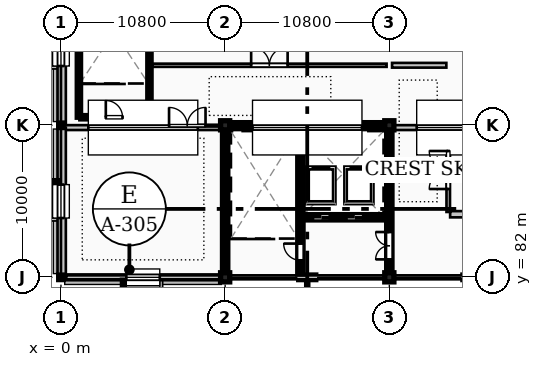
"""IFC4 building model, lengths in metres.
Left out: names, types, materials, properties, quantities, classifications, styles, units other than length and angle.
Written with IfcOpenShell. Run it as: python <this file> out.ifc"""

import sys

from ifc_helpers import new_model, si_unit, direction, frame, frame_2d, origin, origin_2d, place, context, subcontext, project, spatial, polyline, rectangle, i_section, outline, extrude, element, fill, save


model = new_model("IFC4")
c1 = context("Model", 3, precision=1e-05, world=origin(), true_north=direction((0.0, 1.0)))
c2 = subcontext(c1, "Body", "Model", "MODEL_VIEW")
j1 = project(units=[si_unit("LENGTHUNIT", "METRE"), si_unit("PLANEANGLEUNIT", "RADIAN")], contexts=[c1])
p1 = place(None, origin())
s1 = spatial("IfcSite", under=j1, at=p1, CompositionType="ELEMENT")
p2 = place(p1, origin())
s2 = spatial("IfcBuilding", under=s1, at=p2, CompositionType="ELEMENT")
p3 = place(p2, frame((0.0, 0.0, 28.8)))
s3 = spatial("IfcBuildingStorey", under=s2, at=p3, CompositionType="ELEMENT", Elevation=28.8)
for number, where, z_axis, x_axis in (
    (1, (0.0, 82.0, 0.0), (0.0, 0.0, 1.0), (1.0, 0.0, 0.0)),
    (2, (0.0, 92.0, 0.0), (0.0, 0.0, 1.0), (1.0, 0.0, 0.0)),
):
    element("IfcColumn", number, at=place(p3, frame(where, z_axis=z_axis, x_axis=x_axis)), inside=s3, PredefinedType="COLUMN", context=c2, shape_type="SweptSolid", body=[
        extrude(i_section(OverallWidth=0.3, OverallDepth=0.3, WebThickness=0.011, FlangeThickness=0.019, FilletRadius=0.027, at=origin_2d()), origin(), (0.0, 0.0, 1.0), 5.4),
    ])
for number, where, z_axis, x_axis in (
    (3, (10.8, 82.0, 0.0), (0.0, 0.0, 1.0), (1.0, 0.0, 0.0)),
    (4, (10.8, 92.0, 0.0), (0.0, 0.0, 1.0), (1.0, 0.0, 0.0)),
    (5, (21.6, 82.0, 0.0), (0.0, 0.0, 1.0), (1.0, 0.0, 0.0)),
    (6, (21.6, 92.0, 0.0), (0.0, 0.0, 1.0), (1.0, 0.0, 0.0)),
):
    element("IfcColumn", number, at=place(p3, frame(where, z_axis=z_axis, x_axis=x_axis)), inside=s3, PredefinedType="COLUMN", context=c2, shape_type="SweptSolid", body=[
        extrude(rectangle(XDim=0.6, YDim=0.6, at=origin_2d()), origin(), (0.0, 0.0, 1.0), 5.4),
    ])
p4 = place(p3, frame((0.0, 101.855, 0.0), z_axis=(0.0, 0.0, 1.0), x_axis=(0.0, -1.0, 0.0)))
e7 = element("IfcWall", 7, at=p4, inside=s3, PredefinedType="STANDARD", context=c2, shape_type="SweptSolid", body=[
    extrude(rectangle(XDim=9.71, YDim=0.45, at=frame_2d((4.855, 0.0))), origin(), (0.0, 0.0, 1.0), 5.16),
])
p5 = place(p4, frame((3.755, 0.0, 1.0)))
e8 = element("IfcOpeningElement", 8, at=p5, cuts=e7, PredefinedType="OPENING", context=c2, shape_type="SweptSolid", body=[
    extrude(rectangle(XDim=2.2, YDim=3.0, at=frame_2d((1.1, 1.5))), frame((0.0, 0.235, 0.0), z_axis=(0.0, -1.0, 0.0), x_axis=(1.0, 0.0, 0.0)), (0.0, 0.0, 1.0), 0.47),
])
p6 = place(p3, frame((0.0, 91.855, 0.0), z_axis=(0.0, 0.0, 1.0), x_axis=(0.0, -1.0, 0.0)))
e9 = element("IfcWall", 9, at=p6, inside=s3, PredefinedType="STANDARD", context=c2, shape_type="SweptSolid", body=[
    extrude(rectangle(XDim=9.71, YDim=0.45, at=frame_2d((4.855, 0.0))), origin(), (0.0, 0.0, 1.0), 5.16),
])
p7 = place(p6, frame((3.755, 0.0, 1.0)))
e10 = element("IfcOpeningElement", 10, at=p7, cuts=e9, PredefinedType="OPENING", context=c2, shape_type="SweptSolid", body=[
    extrude(rectangle(XDim=2.2, YDim=3.0, at=frame_2d((1.1, 1.5))), frame((0.0, 0.235, 0.0), z_axis=(0.0, -1.0, 0.0), x_axis=(1.0, 0.0, 0.0)), (0.0, 0.0, 1.0), 0.47),
])
p8 = place(p3, frame((0.145, 82.0, 0.0), z_axis=(0.0, 0.0, 1.0), x_axis=(1.0, 0.0, 0.0)))
e11 = element("IfcWall", 11, at=p8, inside=s3, PredefinedType="STANDARD", context=c2, shape_type="SweptSolid", body=[
    extrude(rectangle(XDim=10.51, YDim=0.38, at=frame_2d((5.255, 0.0))), origin(), (0.0, 0.0, 1.0), 5.044),
])
p9 = place(p8, frame((4.155, 0.0, 1.0)))
e12 = element("IfcOpeningElement", 12, at=p9, cuts=e11, PredefinedType="OPENING", context=c2, shape_type="SweptSolid", body=[
    extrude(rectangle(XDim=2.2, YDim=3.0, at=frame_2d((1.1, 1.5))), frame((0.0, 0.2, 0.0), z_axis=(0.0, -1.0, 0.0), x_axis=(1.0, 0.0, 0.0)), (0.0, 0.0, 1.0), 0.4),
])
p10 = place(p3, frame((15.55, 82.0, 0.0), z_axis=(0.0, 0.0, 1.0), x_axis=(1.0, 0.0, 0.0)))
e13 = element("IfcWall", 13, at=p10, inside=s3, PredefinedType="STANDARD", context=c2, shape_type="SweptSolid", body=[
    extrude(rectangle(XDim=1.3, YDim=0.48, at=frame_2d((0.65, 0.0))), origin(), (0.0, 0.0, 1.0), 5.044),
])
p11 = place(p3, frame((10.945, 82.0, 0.0), z_axis=(0.0, 0.0, 1.0), x_axis=(1.0, 0.0, 0.0)))
e14 = element("IfcWall", 14, at=p11, inside=s3, PredefinedType="STANDARD", context=c2, shape_type="SweptSolid", body=[
    extrude(rectangle(XDim=0.225, YDim=0.3, at=frame_2d((0.112, 0.0))), origin(), (0.0, 0.0, 1.0), 5.16),
])
p12 = place(p3, frame((21.23, 82.0, 0.0), z_axis=(0.0, 0.0, 1.0), x_axis=(1.0, 0.0, 0.0)))
e15 = element("IfcWall", 15, at=p12, inside=s3, PredefinedType="STANDARD", context=c2, shape_type="SweptSolid", body=[
    extrude(rectangle(XDim=0.225, YDim=0.3, at=frame_2d((0.113, 0.0))), origin(), (0.0, 0.0, 1.0), 5.16),
])
p13 = place(p3, frame((21.745, 82.0, 0.0), z_axis=(0.0, 0.0, 1.0), x_axis=(1.0, 0.0, 0.0)))
e16 = element("IfcWall", 16, at=p13, inside=s3, PredefinedType="STANDARD", context=c2, shape_type="SweptSolid", body=[
    extrude(rectangle(XDim=0.225, YDim=0.3, at=frame_2d((0.112, 0.0))), origin(), (0.0, 0.0, 1.0), 5.16),
])
p14 = place(p3, frame((0.16, 91.85, 5.4), z_axis=(0.0, 0.0, 1.0), x_axis=(1.0, 0.0, 0.0)))
e17 = element("IfcWall", 17, at=p14, inside=s3, PredefinedType="STANDARD", context=c2, shape_type="SweptSolid", body=[
    extrude(rectangle(XDim=10.48, YDim=0.32, at=frame_2d((5.24, 0.0))), origin(), (0.0, 0.0, 1.0), 2.45),
])
p15 = place(p14, frame((1.64, 0.0, 0.45)))
e18 = element("IfcOpeningElement", 18, at=p15, cuts=e17, PredefinedType="OPENING", context=c2, shape_type="SweptSolid", body=[
    extrude(rectangle(XDim=7.2, YDim=1.5, at=frame_2d((3.6, 0.75))), frame((0.0, 0.17, 0.0), z_axis=(0.0, -1.0, 0.0), x_axis=(1.0, 0.0, 0.0)), (0.0, 0.0, 1.0), 0.34),
])
p16 = place(p3, frame((10.96, 91.85, 5.4), z_axis=(0.0, 0.0, 1.0), x_axis=(1.0, 0.0, 0.0)))
e19 = element("IfcWall", 19, at=p16, inside=s3, PredefinedType="STANDARD", context=c2, shape_type="SweptSolid", body=[
    extrude(rectangle(XDim=10.48, YDim=0.32, at=frame_2d((5.24, 0.0))), origin(), (0.0, 0.0, 1.0), 2.45),
])
p17 = place(p16, frame((1.64, 0.0, 0.45)))
e20 = element("IfcOpeningElement", 20, at=p17, cuts=e19, PredefinedType="OPENING", context=c2, shape_type="SweptSolid", body=[
    extrude(rectangle(XDim=7.2, YDim=1.5, at=frame_2d((3.6, 0.75))), frame((0.0, 0.17, 0.0), z_axis=(0.0, -1.0, 0.0), x_axis=(1.0, 0.0, 0.0)), (0.0, 0.0, 1.0), 0.34),
])
p18 = place(p3, frame((21.76, 91.85, 5.4), z_axis=(0.0, 0.0, 1.0), x_axis=(1.0, 0.0, 0.0)))
e21 = element("IfcWall", 21, at=p18, inside=s3, PredefinedType="STANDARD", context=c2, shape_type="SweptSolid", body=[
    extrude(rectangle(XDim=10.48, YDim=0.32, at=frame_2d((5.24, 0.0))), origin(), (0.0, 0.0, 1.0), 2.45),
])
p19 = place(p18, frame((1.64, 0.0, 0.45)))
e22 = element("IfcOpeningElement", 22, at=p19, cuts=e21, PredefinedType="OPENING", context=c2, shape_type="SweptSolid", body=[
    extrude(rectangle(XDim=7.2, YDim=1.5, at=frame_2d((3.6, 0.75))), frame((0.0, 0.17, 0.0), z_axis=(0.0, -1.0, 0.0), x_axis=(1.0, 0.0, 0.0)), (0.0, 0.0, 1.0), 0.34),
])
for number, where, z_axis, x_axis in (
    (23, (0.16, 82.05, 5.4), (0.0, 0.0, 1.0), (0.0, 1.0, 0.0)),
    (24, (0.16, 92.05, 5.4), (0.0, 0.0, 1.0), (0.0, 1.0, 0.0)),
):
    element("IfcWall", number, at=place(p3, frame(where, z_axis=z_axis, x_axis=x_axis)), inside=s3, PredefinedType="STANDARD", context=c2, shape_type="SweptSolid", body=[
        extrude(outline(polyline([(0.0, 0.0), (9.8, 0.0), (9.8, 2.55), (0.0, 0.15), (0.0, 0.0)])), frame((0.0, 0.16, 0.0), z_axis=(0.0, -1.0, 0.0), x_axis=(1.0, 0.0, 0.0)), (0.0, 0.0, 1.0), 0.32),
    ])
p20 = place(p3, frame((0.35, 82.0, 5.22), z_axis=(0.0, 0.0, 1.0), x_axis=(1.0, 0.0, 0.0)))
e25 = element("IfcWall", 25, at=p20, inside=s3, PredefinedType="PARAPET", context=c2, shape_type="SweptSolid", body=[
    extrude(rectangle(XDim=74.9, YDim=0.26, at=frame_2d((37.45, 0.0))), origin(), (0.0, 0.0, 1.0), 0.55),
])
p21 = place(p3, frame((11.1, 92.0, 0.0), z_axis=(0.0, 0.0, 1.0), x_axis=(1.0, 0.0, 0.0)))
e26 = element("IfcWall", 26, at=p21, inside=s3, PredefinedType="SHEAR", context=c2, shape_type="SweptSolid", body=[
    extrude(rectangle(XDim=10.2, YDim=0.35, at=frame_2d((5.1, 0.0))), origin(), (0.0, 0.0, 1.0), 5.16),
])
p22 = place(p3, frame((10.8, 82.3, 0.0), z_axis=(0.0, 0.0, 1.0), x_axis=(0.0, 1.0, 0.0)))
e27 = element("IfcWall", 27, at=p22, inside=s3, PredefinedType="SHEAR", context=c2, shape_type="SweptSolid", body=[
    extrude(rectangle(XDim=9.4, YDim=0.35, at=frame_2d((4.7, 0.0))), origin(), (0.0, 0.0, 1.0), 5.16),
])
p23 = place(p3, frame((21.6, 82.3, 0.0), z_axis=(0.0, 0.0, 1.0), x_axis=(0.0, 1.0, 0.0)))
e28 = element("IfcWall", 28, at=p23, inside=s3, PredefinedType="SHEAR", context=c2, shape_type="SweptSolid", body=[
    extrude(rectangle(XDim=9.4, YDim=0.35, at=frame_2d((4.7, 0.0))), origin(), (0.0, 0.0, 1.0), 5.16),
])
p24 = place(p23, frame((0.88, 0.0, 0.0)))
e29 = element("IfcOpeningElement", 29, at=p24, cuts=e28, PredefinedType="OPENING", context=c2, shape_type="SweptSolid", body=[
    extrude(rectangle(XDim=1.8, YDim=2.25, at=frame_2d((0.9, 1.125))), frame((0.0, 0.185, 0.0), z_axis=(0.0, -1.0, 0.0), x_axis=(1.0, 0.0, 0.0)), (0.0, 0.0, 1.0), 0.37),
])
p25 = place(p3, frame((15.75, 82.22, 0.0), z_axis=(0.0, 0.0, 1.0), x_axis=(0.0, 1.0, 0.0)))
e30 = element("IfcWall", 30, at=p25, inside=s3, PredefinedType="SHEAR", context=c2, shape_type="SweptSolid", body=[
    extrude(rectangle(XDim=9.605, YDim=0.35, at=frame_2d((4.802, 0.0))), origin(), (0.0, 0.0, 1.0), 5.16),
])
p26 = place(p25, frame((0.9, 0.0, 0.0)))
e31 = element("IfcOpeningElement", 31, at=p26, cuts=e30, PredefinedType="OPENING", context=c2, shape_type="SweptSolid", body=[
    extrude(rectangle(XDim=1.1, YDim=2.2, at=frame_2d((0.55, 1.1))), frame((0.0, 0.185, 0.0), z_axis=(0.0, -1.0, 0.0), x_axis=(1.0, 0.0, 0.0)), (0.0, 0.0, 1.0), 0.37),
])
p27 = place(p3, frame((15.93, 85.95, 0.0), z_axis=(0.0, 0.0, 1.0), x_axis=(1.0, 0.0, 0.0)))
e32 = element("IfcWall", 32, at=p27, inside=s3, PredefinedType="SHEAR", context=c2, shape_type="SweptSolid", body=[
    extrude(rectangle(XDim=5.49, YDim=0.35, at=frame_2d((2.745, 0.0))), origin(), (0.0, 0.0, 1.0), 5.16),
])
p28 = place(p27, frame((0.65, 0.0, 0.0)))
e33 = element("IfcOpeningElement", 33, at=p28, cuts=e32, PredefinedType="OPENING", context=c2, shape_type="SweptSolid", body=[
    extrude(rectangle(XDim=1.1, YDim=2.2, at=frame_2d((0.55, 1.1))), frame((0.0, 0.185, 0.0), z_axis=(0.0, -1.0, 0.0), x_axis=(1.0, 0.0, 0.0)), (0.0, 0.0, 1.0), 0.37),
])
p29 = place(p27, frame((2.85, 0.0, 0.0)))
e34 = element("IfcOpeningElement", 34, at=p29, cuts=e32, PredefinedType="OPENING", context=c2, shape_type="SweptSolid", body=[
    extrude(rectangle(XDim=1.1, YDim=2.2, at=frame_2d((0.55, 1.1))), frame((0.0, 0.185, 0.0), z_axis=(0.0, -1.0, 0.0), x_axis=(1.0, 0.0, 0.0)), (0.0, 0.0, 1.0), 0.37),
])
for number, where, z_axis, x_axis in (
    (35, (1.18, 92.53, 0.0), (0.0, 0.0, 1.0), (0.0, 1.0, 0.0)),
    (36, (5.82, 92.53, 0.0), (0.0, 0.0, 1.0), (0.0, 1.0, 0.0)),
):
    element("IfcWall", number, at=place(p3, frame(where, z_axis=z_axis, x_axis=x_axis)), inside=s3, PredefinedType="SHEAR", context=c2, shape_type="SweptSolid", body=[
        extrude(rectangle(XDim=9.14, YDim=0.22, at=frame_2d((4.57, 0.0))), origin(), (0.0, 0.0, 1.0), 5.16),
    ])
p30 = place(p3, frame((1.3, 92.53, 0.0), z_axis=(0.0, 0.0, 1.0), x_axis=(1.0, 0.0, 0.0)))
e37 = element("IfcWall", 37, at=p30, inside=s3, PredefinedType="SHEAR", context=c2, shape_type="SweptSolid", body=[
    extrude(rectangle(XDim=4.4, YDim=0.22, at=frame_2d((2.2, 0.0))), origin(), (0.0, 0.0, 1.0), 5.16),
])
p31 = place(p30, frame((1.65, 0.0, 0.0)))
e38 = element("IfcOpeningElement", 38, at=p31, cuts=e37, PredefinedType="OPENING", context=c2, shape_type="SweptSolid", body=[
    extrude(rectangle(XDim=1.1, YDim=2.2, at=frame_2d((0.55, 1.1))), frame((0.0, 0.12, 0.0), z_axis=(0.0, -1.0, 0.0), x_axis=(1.0, 0.0, 0.0)), (0.0, 0.0, 1.0), 0.24),
])
p32 = place(p3, frame((25.6, 86.15, 0.0), z_axis=(0.0, 0.0, 1.0), x_axis=(1.0, 0.0, 0.0)))
e39 = element("IfcWall", 39, at=p32, inside=s3, PredefinedType="PARTITIONING", context=c2, shape_type="SweptSolid", body=[
    extrude(rectangle(XDim=28.22, YDim=0.41, at=frame_2d((14.11, 0.0))), origin(), (0.0, 0.0, 1.0), 5.12),
])
p33 = place(p32, frame((13.235, 0.0, 0.0)))
e40 = element("IfcOpeningElement", 40, at=p33, cuts=e39, PredefinedType="OPENING", context=c2, shape_type="SweptSolid", body=[
    extrude(rectangle(XDim=1.75, YDim=2.45, at=frame_2d((0.875, 1.225))), frame((0.0, 0.215, 0.0), z_axis=(0.0, -1.0, 0.0), x_axis=(1.0, 0.0, 0.0)), (0.0, 0.0, 1.0), 0.43),
])
p34 = place(p3, frame((6.0, 91.975, 0.0), z_axis=(0.0, 0.0, 1.0), x_axis=(1.0, 0.0, 0.0)))
e41 = element("IfcWall", 41, at=p34, inside=s3, PredefinedType="PARTITIONING", context=c2, shape_type="SweptSolid", body=[
    extrude(rectangle(XDim=4.62, YDim=0.11, at=frame_2d((2.31, 0.0))), origin(), (0.0, 0.0, 1.0), 5.044),
])
p35 = place(p34, frame((1.11, 0.0, 0.0)))
e42 = element("IfcOpeningElement", 42, at=p35, cuts=e41, PredefinedType="OPENING", context=c2, shape_type="SweptSolid", body=[
    extrude(rectangle(XDim=2.4, YDim=2.8, at=frame_2d((1.2, 1.4))), frame((0.0, 0.065, 0.0), z_axis=(0.0, -1.0, 0.0), x_axis=(1.0, 0.0, 0.0)), (0.0, 0.0, 1.0), 0.13),
])
p36 = place(p3, frame((6.0, 95.95, 0.0), z_axis=(0.0, 0.0, 1.0), x_axis=(1.0, 0.0, 0.0)))
e43 = element("IfcWall", 43, at=p36, inside=s3, PredefinedType="PARTITIONING", context=c2, shape_type="SweptSolid", body=[
    extrude(rectangle(XDim=15.42, YDim=0.21, at=frame_2d((7.71, 0.0))), origin(), (0.0, 0.0, 1.0), 5.12),
])
p37 = place(p36, frame((6.51, 0.0, 0.0)))
e44 = element("IfcOpeningElement", 44, at=p37, cuts=e43, PredefinedType="OPENING", context=c2, shape_type="SweptSolid", body=[
    extrude(rectangle(XDim=2.4, YDim=2.8, at=frame_2d((1.2, 1.4))), frame((0.0, 0.115, 0.0), z_axis=(0.0, -1.0, 0.0), x_axis=(1.0, 0.0, 0.0)), (0.0, 0.0, 1.0), 0.23),
])
p38 = place(p3, frame((25.475, 86.3, 0.0), z_axis=(0.0, 0.0, 1.0), x_axis=(0.0, 1.0, 0.0)))
e45 = element("IfcWall", 45, at=p38, inside=s3, PredefinedType="PARTITIONING", context=c2, shape_type="SweptSolid", body=[
    extrude(rectangle(XDim=5.52, YDim=0.23, at=frame_2d((2.76, 0.0))), origin(), (0.0, 0.0, 1.0), 5.12),
])
p39 = place(p38, frame((1.51, 0.0, 0.0)))
e46 = element("IfcOpeningElement", 46, at=p39, cuts=e45, PredefinedType="OPENING", context=c2, shape_type="SweptSolid", body=[
    extrude(rectangle(XDim=2.5, YDim=2.75, at=frame_2d((1.25, 1.375))), frame((0.0, 0.125, 0.0), z_axis=(0.0, -1.0, 0.0), x_axis=(1.0, 0.0, 0.0)), (0.0, 0.0, 1.0), 0.25),
])
p40 = place(p3, frame((21.78, 95.95, 0.0), z_axis=(0.0, 0.0, 1.0), x_axis=(1.0, 0.0, 0.0)))
e47 = element("IfcWall", 47, at=p40, inside=s3, PredefinedType="PARTITIONING", context=c2, shape_type="SweptSolid", body=[
    extrude(rectangle(XDim=3.57, YDim=0.31, at=frame_2d((1.785, 0.0))), origin(), (0.0, 0.0, 1.0), 5.12),
])
p41 = place(p5, origin())
e48 = element("IfcWindow", 48, at=p41, inside=s3, PartitioningType="SINGLE_PANEL", PredefinedType="WINDOW", context=c2, shape_type="SweptSolid", body=[
    extrude(rectangle(XDim=2.2, YDim=3.0, at=frame_2d((1.1, 1.5))), frame((0.0, 0.03, 0.0), z_axis=(0.0, -1.0, 0.0), x_axis=(1.0, 0.0, 0.0)), (0.0, 0.0, 1.0), 0.06),
])
fill(e8, e48)
p42 = place(p7, origin())
e49 = element("IfcWindow", 49, at=p42, inside=s3, PartitioningType="SINGLE_PANEL", PredefinedType="WINDOW", context=c2, shape_type="SweptSolid", body=[
    extrude(rectangle(XDim=2.2, YDim=3.0, at=frame_2d((1.1, 1.5))), frame((0.0, 0.03, 0.0), z_axis=(0.0, -1.0, 0.0), x_axis=(1.0, 0.0, 0.0)), (0.0, 0.0, 1.0), 0.06),
])
fill(e10, e49)
p43 = place(p9, origin())
e50 = element("IfcWindow", 50, at=p43, inside=s3, PartitioningType="SINGLE_PANEL", PredefinedType="WINDOW", context=c2, shape_type="SweptSolid", body=[
    extrude(rectangle(XDim=2.2, YDim=3.0, at=frame_2d((1.1, 1.5))), frame((0.0, 0.03, 0.0), z_axis=(0.0, -1.0, 0.0), x_axis=(1.0, 0.0, 0.0)), (0.0, 0.0, 1.0), 0.06),
])
fill(e12, e50)
p44 = place(p15, origin())
e51 = element("IfcWindow", 51, at=p44, inside=s3, PartitioningType="SINGLE_PANEL", PredefinedType="SKYLIGHT", context=c2, shape_type="SweptSolid", body=[
    extrude(rectangle(XDim=7.2, YDim=1.5, at=frame_2d((3.6, 0.75))), frame((0.0, 0.03, 0.0), z_axis=(0.0, -1.0, 0.0), x_axis=(1.0, 0.0, 0.0)), (0.0, 0.0, 1.0), 0.06),
])
fill(e18, e51)
p45 = place(p17, origin())
e52 = element("IfcWindow", 52, at=p45, inside=s3, PartitioningType="SINGLE_PANEL", PredefinedType="SKYLIGHT", context=c2, shape_type="SweptSolid", body=[
    extrude(rectangle(XDim=7.2, YDim=1.5, at=frame_2d((3.6, 0.75))), frame((0.0, 0.03, 0.0), z_axis=(0.0, -1.0, 0.0), x_axis=(1.0, 0.0, 0.0)), (0.0, 0.0, 1.0), 0.06),
])
fill(e20, e52)
p46 = place(p19, origin())
e53 = element("IfcWindow", 53, at=p46, inside=s3, PartitioningType="SINGLE_PANEL", PredefinedType="SKYLIGHT", context=c2, shape_type="SweptSolid", body=[
    extrude(rectangle(XDim=7.2, YDim=1.5, at=frame_2d((3.6, 0.75))), frame((0.0, 0.03, 0.0), z_axis=(0.0, -1.0, 0.0), x_axis=(1.0, 0.0, 0.0)), (0.0, 0.0, 1.0), 0.06),
])
fill(e22, e53)
p47 = place(p26, origin())
e54 = element("IfcDoor", 54, at=p47, inside=s3, OperationType="SINGLE_SWING_RIGHT", PredefinedType="DOOR", context=c2, shape_type="SweptSolid", body=[
    extrude(rectangle(XDim=1.1, YDim=2.2, at=frame_2d((0.55, 1.1))), frame((0.0, 0.025, 0.0), z_axis=(0.0, -1.0, 0.0), x_axis=(1.0, 0.0, 0.0)), (0.0, 0.0, 1.0), 0.05),
])
fill(e31, e54)
p48 = place(p24, origin())
e55 = element("IfcDoor", 55, at=p48, inside=s3, OperationType="DOUBLE_DOOR_SINGLE_SWING", PredefinedType="DOOR", context=c2, shape_type="SweptSolid", body=[
    extrude(rectangle(XDim=1.8, YDim=2.25, at=frame_2d((0.9, 1.125))), frame((0.0, 0.025, 0.0), z_axis=(0.0, -1.0, 0.0), x_axis=(1.0, 0.0, 0.0)), (0.0, 0.0, 1.0), 0.05),
])
fill(e29, e55)
p49 = place(p28, origin())
e56 = element("IfcDoor", 56, at=p49, inside=s3, OperationType="DOUBLE_DOOR_SLIDING", PredefinedType="DOOR", context=c2, shape_type="SweptSolid", body=[
    extrude(rectangle(XDim=1.1, YDim=2.2, at=frame_2d((0.55, 1.1))), frame((0.0, 0.025, 0.0), z_axis=(0.0, -1.0, 0.0), x_axis=(1.0, 0.0, 0.0)), (0.0, 0.0, 1.0), 0.05),
])
fill(e33, e56)
p50 = place(p29, origin())
e57 = element("IfcDoor", 57, at=p50, inside=s3, OperationType="DOUBLE_DOOR_SLIDING", PredefinedType="DOOR", context=c2, shape_type="SweptSolid", body=[
    extrude(rectangle(XDim=1.1, YDim=2.2, at=frame_2d((0.55, 1.1))), frame((0.0, 0.025, 0.0), z_axis=(0.0, -1.0, 0.0), x_axis=(1.0, 0.0, 0.0)), (0.0, 0.0, 1.0), 0.05),
])
fill(e34, e57)
p51 = place(p31, origin())
e58 = element("IfcDoor", 58, at=p51, inside=s3, OperationType="SINGLE_SWING_LEFT", PredefinedType="DOOR", context=c2, shape_type="SweptSolid", body=[
    extrude(rectangle(XDim=1.1, YDim=2.2, at=frame_2d((0.55, 1.1))), frame((0.0, 0.025, 0.0), z_axis=(0.0, -1.0, 0.0), x_axis=(1.0, 0.0, 0.0)), (0.0, 0.0, 1.0), 0.05),
])
fill(e38, e58)
p52 = place(p35, origin())
e59 = element("IfcDoor", 59, at=p52, inside=s3, OperationType="DOUBLE_DOOR_SINGLE_SWING", PredefinedType="DOOR", context=c2, shape_type="SweptSolid", body=[
    extrude(rectangle(XDim=2.4, YDim=2.8, at=frame_2d((1.2, 1.4))), frame((0.0, 0.025, 0.0), z_axis=(0.0, -1.0, 0.0), x_axis=(1.0, 0.0, 0.0)), (0.0, 0.0, 1.0), 0.05),
])
fill(e42, e59)
p53 = place(p37, origin())
e60 = element("IfcDoor", 60, at=p53, inside=s3, OperationType="DOUBLE_DOOR_SINGLE_SWING", PredefinedType="DOOR", context=c2, shape_type="SweptSolid", body=[
    extrude(rectangle(XDim=2.4, YDim=2.8, at=frame_2d((1.2, 1.4))), frame((0.0, 0.025, 0.0), z_axis=(0.0, -1.0, 0.0), x_axis=(1.0, 0.0, 0.0)), (0.0, 0.0, 1.0), 0.05),
])
fill(e44, e60)
p54 = place(p39, origin())
e61 = element("IfcDoor", 61, at=p54, inside=s3, OperationType="DOUBLE_DOOR_SINGLE_SWING", PredefinedType="DOOR", context=c2, shape_type="SweptSolid", body=[
    extrude(rectangle(XDim=2.5, YDim=2.75, at=frame_2d((1.25, 1.375))), frame((0.0, 0.025, 0.0), z_axis=(0.0, -1.0, 0.0), x_axis=(1.0, 0.0, 0.0)), (0.0, 0.0, 1.0), 0.05),
])
fill(e46, e61)
save(model, sys.argv[1])
